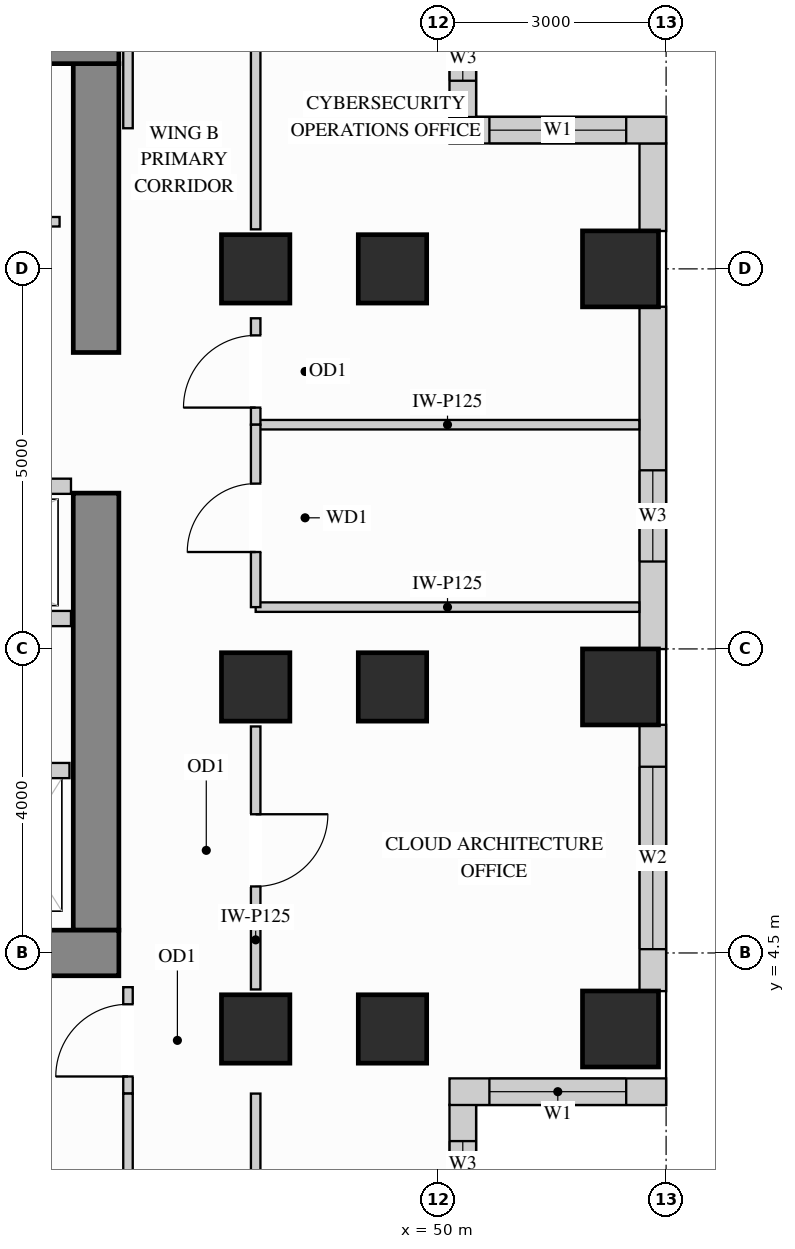
"""IFC4 building model, lengths in metres.
Left out: names, types, materials, properties, quantities, classifications, styles, units other than length and angle.
Written with IfcOpenShell. Run it as: python <this file> out.ifc"""

import sys

from ifc_helpers import new_model, si_unit, direction, frame, frame_2d, origin, origin_2d, place, context, subcontext, project, spatial, rectangle, extrude, source, transform, mapped, element, fill, save


model = new_model("IFC4")
c1 = context("Model", 3, precision=1e-05, world=origin(), true_north=direction((0.0, 1.0)))
c2 = subcontext(c1, "Body", "Model", "MODEL_VIEW")
j1 = project(units=[si_unit("LENGTHUNIT", "METRE"), si_unit("PLANEANGLEUNIT", "RADIAN")], contexts=[c1])
p1 = place(None, origin())
s1 = spatial("IfcSite", under=j1, at=p1, CompositionType="ELEMENT")
p2 = place(p1, origin())
s2 = spatial("IfcBuilding", under=s1, at=p2, CompositionType="ELEMENT")
p3 = place(p2, frame((0.0, 0.0, 168.3)))
s3 = spatial("IfcBuildingStorey", under=s2, at=p3, CompositionType="ELEMENT", Elevation=168.3)
m1 = source(origin(), c2, "Body", "SweptSolid", [
    extrude(rectangle(XDim=0.9, YDim=0.9, at=origin_2d()), origin(), (0.0, 0.0, 1.0), 3.4),
])
for number, where, z_axis, x_axis in (
    (1, (47.6, 13.5, 0.0), (0.0, 0.0, 1.0), (1.0, 0.0, 0.0)),
    (2, (47.6, 3.5, 0.0), (0.0, 0.0, 1.0), (1.0, 0.0, 0.0)),
    (3, (47.6, 8.0, 0.0), (0.0, 0.0, 1.0), (1.0, 0.0, 0.0)),
    (4, (49.4, 13.5, 0.0), (0.0, 0.0, 1.0), (1.0, 0.0, 0.0)),
    (5, (49.4, 3.5, 0.0), (0.0, 0.0, 1.0), (1.0, 0.0, 0.0)),
    (6, (49.4, 8.0, 0.0), (0.0, 0.0, 1.0), (1.0, 0.0, 0.0)),
):
    element("IfcColumn", number, at=place(p3, frame(where, z_axis=z_axis, x_axis=x_axis)), inside=s3, PredefinedType="COLUMN", context=c2, shape_type="MappedRepresentation", body=[
        mapped(m1, transform((0.0, 0.0, 0.0), x_axis=(1.0, 0.0, 0.0), y_axis=(0.0, 1.0, 0.0), z_axis=(0.0, 0.0, 1.0))),
    ])
m2 = source(origin(), c2, "Body", "SweptSolid", [
    extrude(rectangle(XDim=1.0, YDim=1.0, at=origin_2d()), origin(), (0.0, 0.0, 1.0), 3.4),
])
for number, where, z_axis, x_axis in (
    (7, (52.4, 13.5, 0.0), (0.0, 0.0, 1.0), (1.0, 0.0, 0.0)),
    (8, (52.4, 3.5, 0.0), (0.0, 0.0, 1.0), (1.0, 0.0, 0.0)),
    (9, (52.4, 8.0, 0.0), (0.0, 0.0, 1.0), (1.0, 0.0, 0.0)),
):
    element("IfcColumn", number, at=place(p3, frame(where, z_axis=z_axis, x_axis=x_axis)), inside=s3, PredefinedType="COLUMN", context=c2, shape_type="MappedRepresentation", body=[
        mapped(m2, transform((0.0, 0.0, 0.0), x_axis=(1.0, 0.0, 0.0), y_axis=(0.0, 1.0, 0.0), z_axis=(0.0, 0.0, 1.0))),
    ])
m3 = source(origin(), c2, "Body", "SweptSolid", [
    extrude(rectangle(XDim=5.75, YDim=0.6, at=frame_2d((2.875, 0.0))), origin(), (0.0, 0.0, 1.0), 3.4),
])
p4 = place(p3, frame((45.5, 4.8, 0.0), z_axis=(0.0, 0.0, 1.0), x_axis=(0.0, 1.0, 0.0)))
e10 = element("IfcWall", 10, at=p4, inside=s3, PredefinedType="SHEAR", context=c2, shape_type="MappedRepresentation", body=[
    mapped(m3, transform((0.0, 0.0, 0.0), x_axis=(1.0, 0.0, 0.0), y_axis=(0.0, 1.0, 0.0), z_axis=(0.0, 0.0, 1.0))),
])
m4 = source(origin(), c2, "Body", "SweptSolid", [
    extrude(rectangle(XDim=3.8, YDim=0.6, at=frame_2d((1.9, 0.0))), origin(), (0.0, 0.0, 1.0), 3.4),
])
p5 = place(p3, frame((45.5, 12.4, 0.0), z_axis=(0.0, 0.0, 1.0), x_axis=(0.0, 1.0, 0.0)))
e11 = element("IfcWall", 11, at=p5, inside=s3, PredefinedType="SHEAR", context=c2, shape_type="MappedRepresentation", body=[
    mapped(m4, transform((0.0, 0.0, 0.0), x_axis=(1.0, 0.0, 0.0), y_axis=(0.0, 1.0, 0.0), z_axis=(0.0, 0.0, 1.0))),
])
m5 = source(origin(), c2, "Body", "SweptSolid", [
    extrude(rectangle(XDim=10.1, YDim=0.6, at=frame_2d((5.05, 0.0))), origin(), (0.0, 0.0, 1.0), 3.4),
])
for number, where, z_axis, x_axis in (
    (12, (35.7, 16.5, 0.0), (0.0, 0.0, 1.0), (1.0, 0.0, 0.0)),
    (13, (35.7, 4.5, 0.0), (0.0, 0.0, 1.0), (1.0, 0.0, 0.0)),
):
    element("IfcWall", number, at=place(p3, frame(where, z_axis=z_axis, x_axis=x_axis)), inside=s3, PredefinedType="SHEAR", context=c2, shape_type="MappedRepresentation", body=[
        mapped(m5, transform((0.0, 0.0, 0.0), x_axis=(1.0, 0.0, 0.0), y_axis=(0.0, 1.0, 0.0), z_axis=(0.0, 0.0, 1.0))),
    ])
p6 = place(p3, frame((50.325, 0.348, 0.0), z_axis=(0.0, 0.0, 1.0), x_axis=(0.0, 1.0, 0.0)))
e14 = element("IfcWall", 14, at=p6, inside=s3, PredefinedType="SOLIDWALL", context=c2, shape_type="SweptSolid", body=[
    extrude(rectangle(XDim=2.154, YDim=0.35, at=frame_2d((1.077, 0.0))), origin(), (0.0, 0.0, 1.0), 3.385),
])
p7 = place(p6, frame((0.477, 0.0, 0.78)))
e15 = element("IfcOpeningElement", 15, at=p7, cuts=e14, PredefinedType="OPENING", context=c2, shape_type="SweptSolid", body=[
    extrude(rectangle(XDim=1.2, YDim=2.1, at=frame_2d((0.6, 1.05))), frame((0.0, 0.185, 0.0), z_axis=(0.0, -1.0, 0.0), x_axis=(1.0, 0.0, 0.0)), (0.0, 0.0, 1.0), 0.37),
])
p8 = place(p3, frame((50.15, 2.675, 0.0), z_axis=(0.0, 0.0, 1.0), x_axis=(1.0, 0.0, 0.0)))
e16 = element("IfcWall", 16, at=p8, inside=s3, PredefinedType="SOLIDWALL", context=c2, shape_type="SweptSolid", body=[
    extrude(rectangle(XDim=2.85, YDim=0.35, at=frame_2d((1.425, 0.0))), origin(), (0.0, 0.0, 1.0), 3.385),
])
p9 = place(p8, frame((0.525, 0.0, 0.78)))
e17 = element("IfcOpeningElement", 17, at=p9, cuts=e16, PredefinedType="OPENING", context=c2, shape_type="SweptSolid", body=[
    extrude(rectangle(XDim=1.8, YDim=2.1, at=frame_2d((0.9, 1.05))), frame((0.0, 0.185, 0.0), z_axis=(0.0, -1.0, 0.0), x_axis=(1.0, 0.0, 0.0)), (0.0, 0.0, 1.0), 0.37),
])
p10 = place(p3, frame((52.825, 3.998, 0.0), z_axis=(0.0, 0.0, 1.0), x_axis=(0.0, 1.0, 0.0)))
e18 = element("IfcWall", 18, at=p10, inside=s3, PredefinedType="SOLIDWALL", context=c2, shape_type="SweptSolid", body=[
    extrude(rectangle(XDim=3.504, YDim=0.35, at=frame_2d((1.752, 0.0))), origin(), (0.0, 0.0, 1.0), 2.612),
])
p11 = place(p10, frame((0.552, 0.0, 0.78)))
e19 = element("IfcOpeningElement", 19, at=p11, cuts=e18, PredefinedType="OPENING", context=c2, shape_type="SweptSolid", body=[
    extrude(rectangle(XDim=2.4, YDim=1.652, at=frame_2d((1.2, 0.826))), frame((0.0, 0.185, 0.0), z_axis=(0.0, -1.0, 0.0), x_axis=(1.0, 0.0, 0.0)), (0.0, 0.0, 1.0), 0.37),
])
p12 = place(p3, frame((52.825, 8.498, 0.0), z_axis=(0.0, 0.0, 1.0), x_axis=(0.0, 1.0, 0.0)))
e20 = element("IfcWall", 20, at=p12, inside=s3, PredefinedType="SOLIDWALL", context=c2, shape_type="SweptSolid", body=[
    extrude(rectangle(XDim=4.504, YDim=0.35, at=frame_2d((2.252, 0.0))), origin(), (0.0, 0.0, 1.0), 2.612),
])
p13 = place(p12, frame((1.152, 0.0, 0.78)))
e21 = element("IfcOpeningElement", 21, at=p13, cuts=e20, PredefinedType="OPENING", context=c2, shape_type="SweptSolid", body=[
    extrude(rectangle(XDim=1.2, YDim=1.652, at=frame_2d((0.6, 0.826))), frame((0.0, 0.185, 0.0), z_axis=(0.0, -1.0, 0.0), x_axis=(1.0, 0.0, 0.0)), (0.0, 0.0, 1.0), 0.37),
])
m6 = source(origin(), c2, "Body", "SweptSolid", [
    extrude(rectangle(XDim=1.154, YDim=0.35, at=frame_2d((0.577, 0.0))), origin(), (0.0, 0.0, 1.0), 3.385),
])
p14 = place(p3, frame((52.825, 13.998, 0.0), z_axis=(0.0, 0.0, 1.0), x_axis=(0.0, 1.0, 0.0)))
e22 = element("IfcWall", 22, at=p14, inside=s3, PredefinedType="SOLIDWALL", context=c2, shape_type="MappedRepresentation", body=[
    mapped(m6, transform((0.0, 0.0, 0.0), x_axis=(1.0, 0.0, 0.0), y_axis=(0.0, 1.0, 0.0), z_axis=(0.0, 0.0, 1.0))),
])
p15 = place(p3, frame((53.0, 15.325, 0.0), z_axis=(0.0, 0.0, 1.0), x_axis=(-1.0, 0.0, 0.0)))
e23 = element("IfcWall", 23, at=p15, inside=s3, PredefinedType="SOLIDWALL", context=c2, shape_type="SweptSolid", body=[
    extrude(rectangle(XDim=2.85, YDim=0.35, at=frame_2d((1.425, 0.0))), origin(), (0.0, 0.0, 1.0), 3.385),
])
p16 = place(p15, frame((0.525, 0.0, 0.78)))
e24 = element("IfcOpeningElement", 24, at=p16, cuts=e23, PredefinedType="OPENING", context=c2, shape_type="SweptSolid", body=[
    extrude(rectangle(XDim=1.8, YDim=2.1, at=frame_2d((0.9, 1.05))), frame((0.0, 0.185, 0.0), z_axis=(0.0, -1.0, 0.0), x_axis=(1.0, 0.0, 0.0)), (0.0, 0.0, 1.0), 0.37),
])
p17 = place(p3, frame((50.325, 15.498, 0.0), z_axis=(0.0, 0.0, 1.0), x_axis=(0.0, 1.0, 0.0)))
e25 = element("IfcWall", 25, at=p17, inside=s3, PredefinedType="SOLIDWALL", context=c2, shape_type="SweptSolid", body=[
    extrude(rectangle(XDim=2.154, YDim=0.35, at=frame_2d((1.077, 0.0))), origin(), (0.0, 0.0, 1.0), 3.385),
])
p18 = place(p17, frame((0.477, 0.0, 0.78)))
e26 = element("IfcOpeningElement", 26, at=p18, cuts=e25, PredefinedType="OPENING", context=c2, shape_type="SweptSolid", body=[
    extrude(rectangle(XDim=1.2, YDim=2.1, at=frame_2d((0.6, 1.05))), frame((0.0, 0.185, 0.0), z_axis=(0.0, -1.0, 0.0), x_axis=(1.0, 0.0, 0.0)), (0.0, 0.0, 1.0), 0.37),
])
p19 = place(p3, frame((36.5, 14.12, 0.0), z_axis=(0.0, 0.0, 1.0), x_axis=(1.0, 0.0, 0.0)))
e27 = element("IfcWall", 27, at=p19, inside=s3, PredefinedType="PARTITIONING", context=c2, shape_type="SweptSolid", body=[
    extrude(rectangle(XDim=8.52, YDim=0.125, at=frame_2d((4.26, 0.0))), origin(), (0.0, 0.0, 1.0), 3.385),
])
p20 = place(p19, frame((3.785, 0.0, 0.0)))
e28 = element("IfcOpeningElement", 28, at=p20, cuts=e27, PredefinedType="OPENING", context=c2, shape_type="SweptSolid", body=[
    extrude(rectangle(XDim=0.95, YDim=2.15, at=frame_2d((0.475, 1.075))), frame((0.0, 0.073, 0.0), z_axis=(0.0, -1.0, 0.0), x_axis=(1.0, 0.0, 0.0)), (0.0, 0.0, 1.0), 0.145),
])
m7 = source(origin(), c2, "Body", "SweptSolid", [
    extrude(rectangle(XDim=5.048, YDim=0.125, at=frame_2d((2.524, 0.0))), origin(), (0.0, 0.0, 1.0), 3.385),
])
for number, where, z_axis, x_axis in (
    (29, (47.6, 11.45, 0.0), (0.0, 0.0, 1.0), (1.0, 0.0, 0.0)),
    (30, (47.6, 9.05, 0.0), (0.0, 0.0, 1.0), (1.0, 0.0, 0.0)),
):
    element("IfcWall", number, at=place(p3, frame(where, z_axis=z_axis, x_axis=x_axis)), inside=s3, PredefinedType="PARTITIONING", context=c2, shape_type="MappedRepresentation", body=[
        mapped(m7, transform((0.0, 0.0, 0.0), x_axis=(1.0, 0.0, 0.0), y_axis=(0.0, 1.0, 0.0), z_axis=(0.0, 0.0, 1.0))),
    ])
p21 = place(p3, frame((47.6, 4.02, 0.0), z_axis=(0.0, 0.0, 1.0), x_axis=(0.0, 1.0, 0.0)))
e31 = element("IfcWall", 31, at=p21, inside=s3, PredefinedType="PARTITIONING", context=c2, shape_type="SweptSolid", body=[
    extrude(rectangle(XDim=3.46, YDim=0.125, at=frame_2d((1.73, 0.0))), origin(), (0.0, 0.0, 1.0), 2.773),
])
p22 = place(p21, frame((1.355, 0.0, 0.0)))
e32 = element("IfcOpeningElement", 32, at=p22, cuts=e31, PredefinedType="OPENING", context=c2, shape_type="SweptSolid", body=[
    extrude(rectangle(XDim=0.95, YDim=2.15, at=frame_2d((0.475, 1.075))), frame((0.0, 0.073, 0.0), z_axis=(0.0, -1.0, 0.0), x_axis=(1.0, 0.0, 0.0)), (0.0, 0.0, 1.0), 0.145),
])
m8 = source(origin(), c2, "Body", "SweptSolid", [
    extrude(rectangle(XDim=1.53, YDim=0.125, at=frame_2d((0.765, 0.0))), origin(), (0.0, 0.0, 1.0), 2.773),
])
p23 = place(p3, frame((47.6, 1.12, 0.0), z_axis=(0.0, 0.0, 1.0), x_axis=(0.0, 1.0, 0.0)))
e33 = element("IfcWall", 33, at=p23, inside=s3, PredefinedType="PARTITIONING", context=c2, shape_type="MappedRepresentation", body=[
    mapped(m8, transform((0.0, 0.0, 0.0), x_axis=(1.0, 0.0, 0.0), y_axis=(0.0, 1.0, 0.0), z_axis=(0.0, 0.0, 1.0))),
])
p24 = place(p3, frame((47.6, 11.45, 0.0), z_axis=(0.0, 0.0, 1.0), x_axis=(0.0, 1.0, 0.0)))
e34 = element("IfcWall", 34, at=p24, inside=s3, PredefinedType="PARTITIONING", context=c2, shape_type="SweptSolid", body=[
    extrude(rectangle(XDim=1.4, YDim=0.125, at=frame_2d((0.7, 0.0))), origin(), (0.0, 0.0, 1.0), 2.773),
])
p25 = place(p24, frame((0.225, 0.0, 0.0)))
e35 = element("IfcOpeningElement", 35, at=p25, cuts=e34, PredefinedType="OPENING", context=c2, shape_type="SweptSolid", body=[
    extrude(rectangle(XDim=0.95, YDim=2.15, at=frame_2d((0.475, 1.075))), frame((0.0, 0.073, 0.0), z_axis=(0.0, -1.0, 0.0), x_axis=(1.0, 0.0, 0.0)), (0.0, 0.0, 1.0), 0.145),
])
m9 = source(origin(), c2, "Body", "SweptSolid", [
    extrude(rectangle(XDim=2.86, YDim=0.125, at=frame_2d((1.43, 0.0))), origin(), (0.0, 0.0, 1.0), 2.773),
])
p26 = place(p3, frame((47.6, 14.02, 0.0), z_axis=(0.0, 0.0, 1.0), x_axis=(0.0, 1.0, 0.0)))
e36 = element("IfcWall", 36, at=p26, inside=s3, PredefinedType="PARTITIONING", context=c2, shape_type="MappedRepresentation", body=[
    mapped(m9, transform((0.0, 0.0, 0.0), x_axis=(1.0, 0.0, 0.0), y_axis=(0.0, 1.0, 0.0), z_axis=(0.0, 0.0, 1.0))),
])
p27 = place(p3, frame((47.6, 9.05, 0.0), z_axis=(0.0, 0.0, 1.0), x_axis=(0.0, 1.0, 0.0)))
e37 = element("IfcWall", 37, at=p27, inside=s3, PredefinedType="PARTITIONING", context=c2, shape_type="SweptSolid", body=[
    extrude(rectangle(XDim=2.4, YDim=0.125, at=frame_2d((1.2, 0.0))), origin(), (0.0, 0.0, 1.0), 2.773),
])
p28 = place(p27, frame((0.725, 0.0, 0.0)))
e38 = element("IfcOpeningElement", 38, at=p28, cuts=e37, PredefinedType="OPENING", context=c2, shape_type="SweptSolid", body=[
    extrude(rectangle(XDim=0.9, YDim=2.15, at=frame_2d((0.45, 1.075))), frame((0.0, 0.073, 0.0), z_axis=(0.0, -1.0, 0.0), x_axis=(1.0, 0.0, 0.0)), (0.0, 0.0, 1.0), 0.145),
])
m10 = source(origin(), c2, "Body", "SweptSolid", [
    extrude(rectangle(XDim=2.298, YDim=0.125, at=frame_2d((1.149, 0.0))), origin(), (0.0, 0.0, 1.0), 3.385),
])
p29 = place(p3, frame((45.92, 15.35, 0.0), z_axis=(0.0, 0.0, 1.0), x_axis=(0.0, 1.0, 0.0)))
e39 = element("IfcWall", 39, at=p29, inside=s3, PredefinedType="PARTITIONING", context=c2, shape_type="MappedRepresentation", body=[
    mapped(m10, transform((0.0, 0.0, 0.0), x_axis=(1.0, 0.0, 0.0), y_axis=(0.0, 1.0, 0.0), z_axis=(0.0, 0.0, 1.0))),
])
p30 = place(p3, frame((45.92, 2.65, 0.0), z_axis=(0.0, 0.0, 1.0), x_axis=(0.0, 1.0, 0.0)))
e40 = element("IfcWall", 40, at=p30, inside=s3, PredefinedType="PARTITIONING", context=c2, shape_type="SweptSolid", body=[
    extrude(rectangle(XDim=1.4, YDim=0.125, at=frame_2d((0.7, 0.0))), origin(), (0.0, 0.0, 1.0), 3.385),
])
p31 = place(p30, frame((0.225, 0.0, 0.0)))
e41 = element("IfcOpeningElement", 41, at=p31, cuts=e40, PredefinedType="OPENING", context=c2, shape_type="SweptSolid", body=[
    extrude(rectangle(XDim=0.95, YDim=2.15, at=frame_2d((0.475, 1.075))), frame((0.0, 0.073, 0.0), z_axis=(0.0, -1.0, 0.0), x_axis=(1.0, 0.0, 0.0)), (0.0, 0.0, 1.0), 0.145),
])
p32 = place(p3, frame((45.92, 0.352, 0.0), z_axis=(0.0, 0.0, 1.0), x_axis=(0.0, 1.0, 0.0)))
e42 = element("IfcWall", 42, at=p32, inside=s3, PredefinedType="PARTITIONING", context=c2, shape_type="MappedRepresentation", body=[
    mapped(m10, transform((0.0, 0.0, 0.0), x_axis=(1.0, 0.0, 0.0), y_axis=(0.0, 1.0, 0.0), z_axis=(0.0, 0.0, 1.0))),
])
m11 = source(origin(), c2, "Body", "SweptSolid", [
    extrude(rectangle(XDim=1.3, YDim=0.2, at=frame_2d((0.65, 0.0))), origin(), (0.0, 0.0, 1.0), 3.385),
])
p33 = place(p3, frame((43.85, 6.9, 0.0), z_axis=(0.0, 0.0, 1.0), x_axis=(1.0, 0.0, 0.0)))
e43 = element("IfcWall", 43, at=p33, inside=s3, PredefinedType="PARTITIONING", context=c2, shape_type="MappedRepresentation", body=[
    mapped(m11, transform((0.0, 0.0, 0.0), x_axis=(1.0, 0.0, 0.0), y_axis=(0.0, 1.0, 0.0), z_axis=(0.0, 0.0, 1.0))),
])
m12 = source(origin(), c2, "Body", "SweptSolid", [
    extrude(rectangle(XDim=3.49, YDim=0.2, at=frame_2d((1.745, 0.0))), origin(), (0.0, 0.0, 1.0), 3.385),
])
for number, where, z_axis, x_axis in (
    (44, (41.68, 10.64, 0.0), (0.0, 0.0, 1.0), (1.0, 0.0, 0.0)),
    (45, (41.68, 8.9, 0.0), (0.0, 0.0, 1.0), (1.0, 0.0, 0.0)),
):
    element("IfcWall", number, at=place(p3, frame(where, z_axis=z_axis, x_axis=x_axis)), inside=s3, PredefinedType="PARTITIONING", context=c2, shape_type="MappedRepresentation", body=[
        mapped(m12, transform((0.0, 0.0, 0.0), x_axis=(1.0, 0.0, 0.0), y_axis=(0.0, 1.0, 0.0), z_axis=(0.0, 0.0, 1.0))),
    ])
m13 = source(origin(), c2, "Body", "SweptSolid", [
    extrude(rectangle(XDim=0.95, YDim=2.15, at=frame_2d((0.475, 1.075))), frame((0.0, 0.025, 0.0), z_axis=(0.0, -1.0, 0.0), x_axis=(1.0, 0.0, 0.0)), (0.0, 0.0, 1.0), 0.05),
])
p34 = place(p31, origin())
e46 = element("IfcDoor", 46, at=p34, inside=s3, OperationType="SINGLE_SWING_LEFT", PredefinedType="DOOR", context=c2, shape_type="MappedRepresentation", body=[
    mapped(m13, transform((0.0, 0.0, 0.0), x_axis=(1.0, 0.0, 0.0), y_axis=(0.0, 1.0, 0.0), z_axis=(0.0, 0.0, 1.0))),
])
fill(e41, e46)
p35 = place(p22, origin())
e47 = element("IfcDoor", 47, at=p35, inside=s3, OperationType="SINGLE_SWING_RIGHT", PredefinedType="DOOR", context=c2, shape_type="MappedRepresentation", body=[
    mapped(m13, transform((0.0, 0.0, 0.0), x_axis=(1.0, 0.0, 0.0), y_axis=(0.0, 1.0, 0.0), z_axis=(0.0, 0.0, 1.0))),
])
fill(e32, e47)
p36 = place(p25, origin())
e48 = element("IfcDoor", 48, at=p36, inside=s3, OperationType="SINGLE_SWING_LEFT", PredefinedType="DOOR", context=c2, shape_type="MappedRepresentation", body=[
    mapped(m13, transform((0.0, 0.0, 0.0), x_axis=(1.0, 0.0, 0.0), y_axis=(0.0, 1.0, 0.0), z_axis=(0.0, 0.0, 1.0))),
])
fill(e35, e48)
m14 = source(origin(), c2, "Body", "SweptSolid", [
    extrude(rectangle(XDim=0.9, YDim=2.15, at=frame_2d((0.45, 1.075))), frame((0.0, 0.025, 0.0), z_axis=(0.0, -1.0, 0.0), x_axis=(1.0, 0.0, 0.0)), (0.0, 0.0, 1.0), 0.05),
])
p37 = place(p28, origin())
e49 = element("IfcDoor", 49, at=p37, inside=s3, OperationType="SINGLE_SWING_LEFT", PredefinedType="DOOR", context=c2, shape_type="MappedRepresentation", body=[
    mapped(m14, transform((0.0, 0.0, 0.0), x_axis=(1.0, 0.0, 0.0), y_axis=(0.0, 1.0, 0.0), z_axis=(0.0, 0.0, 1.0))),
])
fill(e38, e49)
m15 = source(origin(), c2, "Body", "SweptSolid", [
    extrude(rectangle(XDim=1.8, YDim=2.1, at=frame_2d((0.9, 1.05))), frame((0.0, 0.03, 0.0), z_axis=(0.0, -1.0, 0.0), x_axis=(1.0, 0.0, 0.0)), (0.0, 0.0, 1.0), 0.06),
])
p38 = place(p9, origin())
e50 = element("IfcWindow", 50, at=p38, inside=s3, PartitioningType="SINGLE_PANEL", PredefinedType="WINDOW", context=c2, shape_type="MappedRepresentation", body=[
    mapped(m15, transform((0.0, 0.0, 0.0), x_axis=(1.0, 0.0, 0.0), y_axis=(0.0, 1.0, 0.0), z_axis=(0.0, 0.0, 1.0))),
])
fill(e17, e50)
p39 = place(p16, origin())
e51 = element("IfcWindow", 51, at=p39, inside=s3, PartitioningType="SINGLE_PANEL", PredefinedType="WINDOW", context=c2, shape_type="MappedRepresentation", body=[
    mapped(m15, transform((0.0, 0.0, 0.0), x_axis=(1.0, 0.0, 0.0), y_axis=(0.0, 1.0, 0.0), z_axis=(0.0, 0.0, 1.0))),
])
fill(e24, e51)
m16 = source(origin(), c2, "Body", "SweptSolid", [
    extrude(rectangle(XDim=2.4, YDim=1.652, at=frame_2d((1.2, 0.826))), frame((0.0, 0.03, 0.0), z_axis=(0.0, -1.0, 0.0), x_axis=(1.0, 0.0, 0.0)), (0.0, 0.0, 1.0), 0.06),
])
p40 = place(p11, origin())
e52 = element("IfcWindow", 52, at=p40, inside=s3, PartitioningType="SINGLE_PANEL", PredefinedType="WINDOW", context=c2, shape_type="MappedRepresentation", body=[
    mapped(m16, transform((0.0, 0.0, 0.0), x_axis=(1.0, 0.0, 0.0), y_axis=(0.0, 1.0, 0.0), z_axis=(0.0, 0.0, 1.0))),
])
fill(e19, e52)
m17 = source(origin(), c2, "Body", "SweptSolid", [
    extrude(rectangle(XDim=1.2, YDim=2.1, at=frame_2d((0.6, 1.05))), frame((0.0, 0.03, 0.0), z_axis=(0.0, -1.0, 0.0), x_axis=(1.0, 0.0, 0.0)), (0.0, 0.0, 1.0), 0.06),
])
p41 = place(p7, origin())
e53 = element("IfcWindow", 53, at=p41, inside=s3, PartitioningType="SINGLE_PANEL", PredefinedType="WINDOW", context=c2, shape_type="MappedRepresentation", body=[
    mapped(m17, transform((0.0, 0.0, 0.0), x_axis=(1.0, 0.0, 0.0), y_axis=(0.0, 1.0, 0.0), z_axis=(0.0, 0.0, 1.0))),
])
fill(e15, e53)
m18 = source(origin(), c2, "Body", "SweptSolid", [
    extrude(rectangle(XDim=1.2, YDim=1.652, at=frame_2d((0.6, 0.826))), frame((0.0, 0.03, 0.0), z_axis=(0.0, -1.0, 0.0), x_axis=(1.0, 0.0, 0.0)), (0.0, 0.0, 1.0), 0.06),
])
p42 = place(p13, origin())
e54 = element("IfcWindow", 54, at=p42, inside=s3, PartitioningType="SINGLE_PANEL", PredefinedType="WINDOW", context=c2, shape_type="MappedRepresentation", body=[
    mapped(m18, transform((0.0, 0.0, 0.0), x_axis=(1.0, 0.0, 0.0), y_axis=(0.0, 1.0, 0.0), z_axis=(0.0, 0.0, 1.0))),
])
fill(e21, e54)
p43 = place(p18, origin())
e55 = element("IfcWindow", 55, at=p43, inside=s3, PartitioningType="SINGLE_PANEL", PredefinedType="WINDOW", context=c2, shape_type="MappedRepresentation", body=[
    mapped(m17, transform((0.0, 0.0, 0.0), x_axis=(1.0, 0.0, 0.0), y_axis=(0.0, 1.0, 0.0), z_axis=(0.0, 0.0, 1.0))),
])
fill(e26, e55)
save(model, sys.argv[1])
